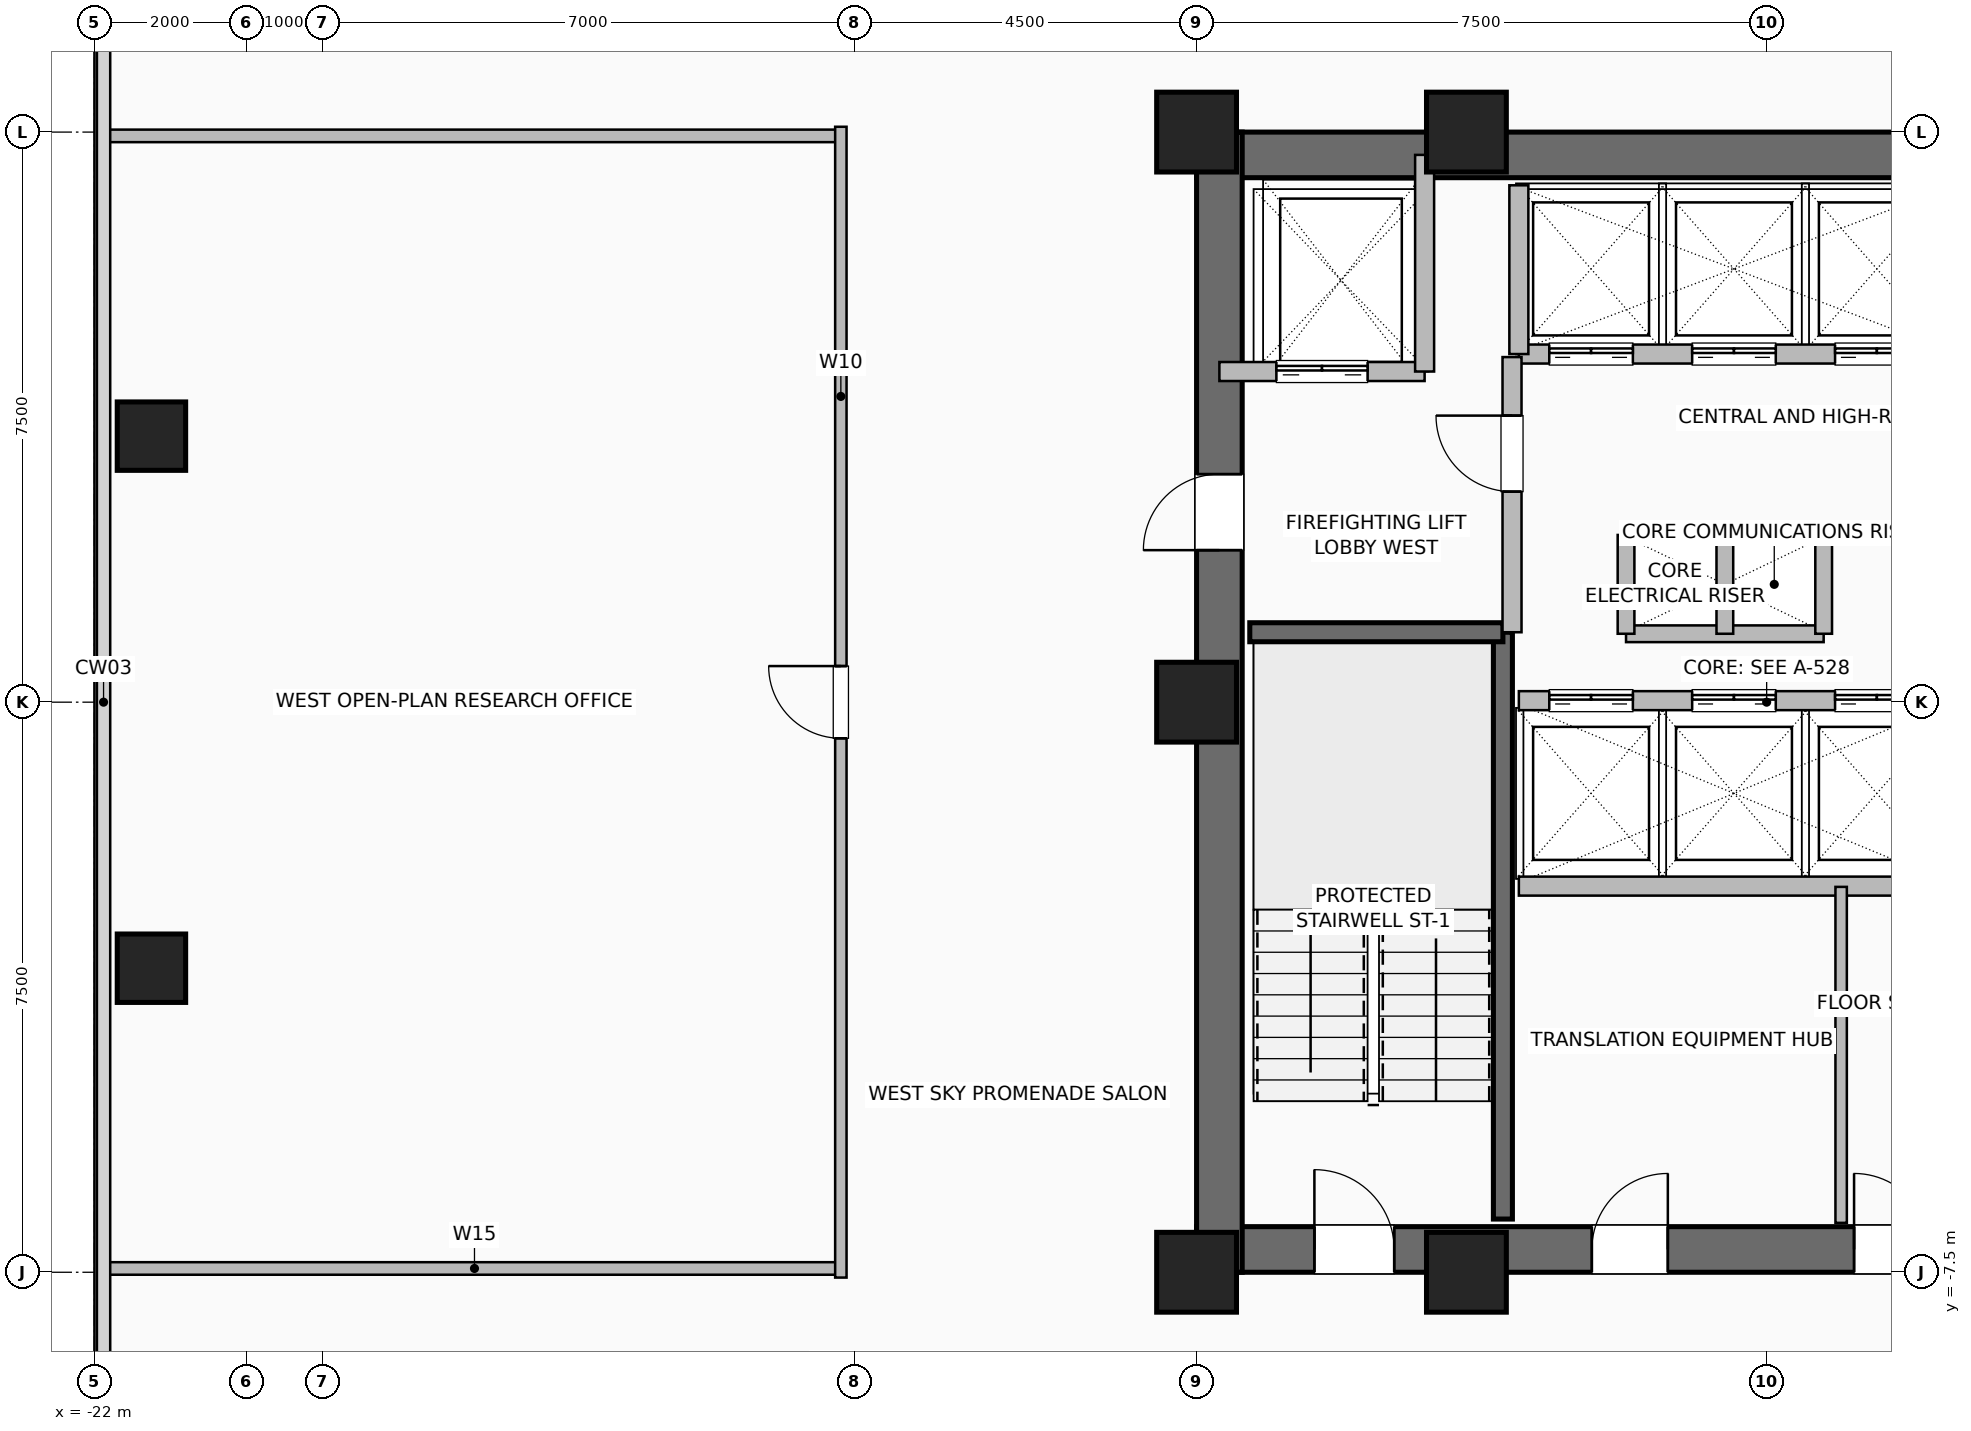
"""IFC4 building model, lengths in metres.
Left out: names, types, materials, properties, quantities, classifications, styles, units other than length and angle.
Written with IfcOpenShell. Run it as: python <this file> out.ifc"""

import sys

from ifc_helpers import new_model, si_unit, direction, frame, frame_2d, origin, origin_2d, place, context, subcontext, project, spatial, rectangle, hollow_rectangle, extrude, element, fill, save


model = new_model("IFC4")
c1 = context("Model", 3, precision=1e-05, world=origin(), true_north=direction((0.0, 1.0)))
c2 = subcontext(c1, "Body", "Model", "MODEL_VIEW")
j1 = project(units=[si_unit("LENGTHUNIT", "METRE"), si_unit("PLANEANGLEUNIT", "RADIAN")], contexts=[c1])
p1 = place(None, origin())
s1 = spatial("IfcSite", under=j1, at=p1, CompositionType="ELEMENT")
p2 = place(p1, origin())
s2 = spatial("IfcBuilding", under=s1, at=p2, CompositionType="ELEMENT")
p3 = place(p2, frame((0.0, 0.0, 108.4)))
s3 = spatial("IfcBuildingStorey", under=s2, at=p3, CompositionType="ELEMENT", Elevation=108.4)
for number, where, z_axis, x_axis in (
    (1, (-7.5, -7.5, 0.0), (0.0, 0.0, 1.0), (1.0, 0.0, 0.0)),
    (2, (-3.95, -7.5, 0.0), (0.0, 0.0, 1.0), (1.0, 0.0, 0.0)),
    (3, (-3.95, 7.5, 0.0), (0.0, 0.0, 1.0), (1.0, 0.0, 0.0)),
    (4, (-7.5, 7.5, 0.0), (0.0, 0.0, 1.0), (1.0, 0.0, 0.0)),
    (5, (-7.5, 0.0, 0.0), (0.0, 0.0, 1.0), (1.0, 0.0, 0.0)),
):
    element("IfcColumn", number, at=place(p3, frame(where, z_axis=z_axis, x_axis=x_axis)), inside=s3, PredefinedType="COLUMN", context=c2, shape_type="SweptSolid", body=[
        extrude(hollow_rectangle(XDim=1.05, YDim=1.05, WallThickness=0.05, at=origin_2d()), origin(), (0.0, 0.0, 1.0), 3.6),
    ])
for number, where, z_axis, x_axis in (
    (6, (-21.25, -3.5, 0.0), (0.0, 0.0, 1.0), (1.0, 0.0, 0.0)),
    (7, (-21.25, 3.5, 0.0), (0.0, 0.0, 1.0), (1.0, 0.0, 0.0)),
):
    element("IfcColumn", number, at=place(p3, frame(where, z_axis=z_axis, x_axis=x_axis)), inside=s3, PredefinedType="COLUMN", context=c2, shape_type="SweptSolid", body=[
        extrude(hollow_rectangle(XDim=0.9, YDim=0.9, WallThickness=0.045, at=origin_2d()), origin(), (0.0, 0.0, 1.0), 3.6),
    ])
p4 = place(p3, frame((-7.5, -7.2, 0.0), z_axis=(0.0, 0.0, 1.0), x_axis=(1.0, 0.0, 0.0)))
e8 = element("IfcWall", 8, at=p4, inside=s3, PredefinedType="SHEAR", context=c2, shape_type="SweptSolid", body=[
    extrude(rectangle(XDim=15.0, YDim=0.6, at=frame_2d((7.5, 0.0))), origin(), (0.0, 0.0, 1.0), 3.36),
])
p5 = place(p4, frame((1.55, 0.0, 0.0)))
e9 = element("IfcOpeningElement", 9, at=p5, cuts=e8, PredefinedType="OPENING", context=c2, shape_type="SweptSolid", body=[
    extrude(rectangle(XDim=1.05, YDim=2.08, at=frame_2d((0.525, 1.04))), frame((0.0, 0.31, 0.0), z_axis=(0.0, -1.0, 0.0), x_axis=(1.0, 0.0, 0.0)), (0.0, 0.0, 1.0), 0.62),
])
p6 = place(p4, frame((12.4, 0.0, 0.0)))
e10 = element("IfcOpeningElement", 10, at=p6, cuts=e8, PredefinedType="OPENING", context=c2, shape_type="SweptSolid", body=[
    extrude(rectangle(XDim=1.05, YDim=2.08, at=frame_2d((0.525, 1.04))), frame((0.0, 0.31, 0.0), z_axis=(0.0, -1.0, 0.0), x_axis=(1.0, 0.0, 0.0)), (0.0, 0.0, 1.0), 0.62),
])
p7 = place(p4, frame((5.2, 0.0, 0.0)))
e11 = element("IfcOpeningElement", 11, at=p7, cuts=e8, PredefinedType="OPENING", context=c2, shape_type="SweptSolid", body=[
    extrude(rectangle(XDim=1.0, YDim=2.08, at=frame_2d((0.5, 1.04))), frame((0.0, 0.31, 0.0), z_axis=(0.0, -1.0, 0.0), x_axis=(1.0, 0.0, 0.0)), (0.0, 0.0, 1.0), 0.62),
])
p8 = place(p4, frame((8.65, 0.0, 0.0)))
e12 = element("IfcOpeningElement", 12, at=p8, cuts=e8, PredefinedType="OPENING", context=c2, shape_type="SweptSolid", body=[
    extrude(rectangle(XDim=1.0, YDim=2.08, at=frame_2d((0.5, 1.04))), frame((0.0, 0.31, 0.0), z_axis=(0.0, -1.0, 0.0), x_axis=(1.0, 0.0, 0.0)), (0.0, 0.0, 1.0), 0.62),
])
p9 = place(p3, frame((-7.5, 7.2, 0.0), z_axis=(0.0, 0.0, 1.0), x_axis=(1.0, 0.0, 0.0)))
e13 = element("IfcWall", 13, at=p9, inside=s3, PredefinedType="SHEAR", context=c2, shape_type="SweptSolid", body=[
    extrude(rectangle(XDim=15.0, YDim=0.6, at=frame_2d((7.5, 0.0))), origin(), (0.0, 0.0, 1.0), 3.36),
])
p10 = place(p3, frame((-7.2, -7.5, 0.0), z_axis=(0.0, 0.0, 1.0), x_axis=(0.0, 1.0, 0.0)))
e14 = element("IfcWall", 14, at=p10, inside=s3, PredefinedType="SHEAR", context=c2, shape_type="SweptSolid", body=[
    extrude(rectangle(XDim=15.0, YDim=0.6, at=frame_2d((7.5, 0.0))), origin(), (0.0, 0.0, 1.0), 3.36),
])
p11 = place(p10, frame((9.5, 0.0, 0.0)))
e15 = element("IfcOpeningElement", 15, at=p11, cuts=e14, PredefinedType="OPENING", context=c2, shape_type="SweptSolid", body=[
    extrude(rectangle(XDim=1.0, YDim=2.08, at=frame_2d((0.5, 1.04))), frame((0.0, 0.31, 0.0), z_axis=(0.0, -1.0, 0.0), x_axis=(1.0, 0.0, 0.0)), (0.0, 0.0, 1.0), 0.62),
])
p12 = place(p3, frame((-3.47, -6.8, 0.0), z_axis=(0.0, 0.0, 1.0), x_axis=(0.0, 1.0, 0.0)))
e16 = element("IfcWall", 16, at=p12, inside=s3, PredefinedType="SHEAR", context=c2, shape_type="SweptSolid", body=[
    extrude(rectangle(XDim=7.72, YDim=0.25, at=frame_2d((3.86, 0.0))), origin(), (0.0, 0.0, 1.0), 3.36),
])
p13 = place(p3, frame((-6.8, 0.92, 0.0), z_axis=(0.0, 0.0, 1.0), x_axis=(1.0, 0.0, 0.0)))
e17 = element("IfcWall", 17, at=p13, inside=s3, PredefinedType="SHEAR", context=c2, shape_type="SweptSolid", body=[
    extrude(rectangle(XDim=3.33, YDim=0.25, at=frame_2d((1.665, 0.0))), origin(), (0.0, 0.0, 1.0), 3.36),
])
for number, where, z_axis, x_axis in (
    (18, (-1.85, 2.2, 0.0), (0.0, 0.0, 1.0), (1.0, 0.0, 0.0)),
    (19, (-1.85, 0.9, 0.0), (0.0, 0.0, 1.0), (1.0, 0.0, 0.0)),
):
    element("IfcWall", number, at=place(p3, frame(where, z_axis=z_axis, x_axis=x_axis)), inside=s3, PredefinedType="PARTITIONING", context=c2, shape_type="SweptSolid", body=[
        extrude(rectangle(XDim=2.6, YDim=0.22, at=frame_2d((1.3, 0.0))), origin(), (0.0, 0.0, 1.0), 3.36),
    ])
for number, where, z_axis, x_axis in (
    (20, (-0.55, 0.9, 0.0), (0.0, 0.0, 1.0), (0.0, 1.0, 0.0)),
    (21, (0.75, 0.9, 0.0), (0.0, 0.0, 1.0), (0.0, 1.0, 0.0)),
    (22, (-1.85, 0.9, 0.0), (0.0, 0.0, 1.0), (0.0, 1.0, 0.0)),
):
    element("IfcWall", number, at=place(p3, frame(where, z_axis=z_axis, x_axis=x_axis)), inside=s3, PredefinedType="PARTITIONING", context=c2, shape_type="SweptSolid", body=[
        extrude(rectangle(XDim=1.3, YDim=0.22, at=frame_2d((0.65, 0.0))), origin(), (0.0, 0.0, 1.0), 3.36),
    ])
p14 = place(p3, frame((-3.26, 0.02, 0.0), z_axis=(0.0, 0.0, 1.0), x_axis=(1.0, 0.0, 0.0)))
e23 = element("IfcWall", 23, at=p14, inside=s3, PredefinedType="SHEAR", context=c2, shape_type="SweptSolid", body=[
    extrude(rectangle(XDim=5.64, YDim=0.25, at=frame_2d((2.82, 0.0))), origin(), (0.0, 0.0, 1.0), 3.36),
])
p15 = place(p14, frame((0.4, 0.0, 0.0)))
e24 = element("IfcOpeningElement", 24, at=p15, cuts=e23, PredefinedType="OPENING", context=c2, shape_type="SweptSolid", body=[
    extrude(rectangle(XDim=1.1, YDim=2.2, at=frame_2d((0.55, 1.1))), frame((0.0, 0.135, 0.0), z_axis=(0.0, -1.0, 0.0), x_axis=(1.0, 0.0, 0.0)), (0.0, 0.0, 1.0), 0.27),
])
p16 = place(p14, frame((2.28, 0.0, 0.0)))
e25 = element("IfcOpeningElement", 25, at=p16, cuts=e23, PredefinedType="OPENING", context=c2, shape_type="SweptSolid", body=[
    extrude(rectangle(XDim=1.1, YDim=2.2, at=frame_2d((0.55, 1.1))), frame((0.0, 0.135, 0.0), z_axis=(0.0, -1.0, 0.0), x_axis=(1.0, 0.0, 0.0)), (0.0, 0.0, 1.0), 0.27),
])
p17 = place(p14, frame((4.16, 0.0, 0.0)))
e26 = element("IfcOpeningElement", 26, at=p17, cuts=e23, PredefinedType="OPENING", context=c2, shape_type="SweptSolid", body=[
    extrude(rectangle(XDim=1.1, YDim=2.2, at=frame_2d((0.55, 1.1))), frame((0.0, 0.135, 0.0), z_axis=(0.0, -1.0, 0.0), x_axis=(1.0, 0.0, 0.0)), (0.0, 0.0, 1.0), 0.27),
])
p18 = place(p3, frame((-3.26, -2.42, 0.0), z_axis=(0.0, 0.0, 1.0), x_axis=(1.0, 0.0, 0.0)))
e27 = element("IfcWall", 27, at=p18, inside=s3, PredefinedType="SHEAR", context=c2, shape_type="SweptSolid", body=[
    extrude(rectangle(XDim=5.64, YDim=0.25, at=frame_2d((2.82, 0.0))), origin(), (0.0, 0.0, 1.0), 3.36),
])
p19 = place(p3, frame((-3.26, 4.58, 0.0), z_axis=(0.0, 0.0, 1.0), x_axis=(1.0, 0.0, 0.0)))
e28 = element("IfcWall", 28, at=p19, inside=s3, PredefinedType="SHEAR", context=c2, shape_type="SweptSolid", body=[
    extrude(rectangle(XDim=5.64, YDim=0.25, at=frame_2d((2.82, 0.0))), origin(), (0.0, 0.0, 1.0), 3.36),
])
p20 = place(p19, frame((0.4, 0.0, 0.0)))
e29 = element("IfcOpeningElement", 29, at=p20, cuts=e28, PredefinedType="OPENING", context=c2, shape_type="SweptSolid", body=[
    extrude(rectangle(XDim=1.1, YDim=2.2, at=frame_2d((0.55, 1.1))), frame((0.0, 0.135, 0.0), z_axis=(0.0, -1.0, 0.0), x_axis=(1.0, 0.0, 0.0)), (0.0, 0.0, 1.0), 0.27),
])
p21 = place(p19, frame((2.28, 0.0, 0.0)))
e30 = element("IfcOpeningElement", 30, at=p21, cuts=e28, PredefinedType="OPENING", context=c2, shape_type="SweptSolid", body=[
    extrude(rectangle(XDim=1.1, YDim=2.2, at=frame_2d((0.55, 1.1))), frame((0.0, 0.135, 0.0), z_axis=(0.0, -1.0, 0.0), x_axis=(1.0, 0.0, 0.0)), (0.0, 0.0, 1.0), 0.27),
])
p22 = place(p19, frame((4.16, 0.0, 0.0)))
e31 = element("IfcOpeningElement", 31, at=p22, cuts=e28, PredefinedType="OPENING", context=c2, shape_type="SweptSolid", body=[
    extrude(rectangle(XDim=1.1, YDim=2.2, at=frame_2d((0.55, 1.1))), frame((0.0, 0.135, 0.0), z_axis=(0.0, -1.0, 0.0), x_axis=(1.0, 0.0, 0.0)), (0.0, 0.0, 1.0), 0.27),
])
p23 = place(p3, frame((-3.26, 4.58, 0.0), z_axis=(0.0, 0.0, 1.0), x_axis=(0.0, 1.0, 0.0)))
e32 = element("IfcWall", 32, at=p23, inside=s3, PredefinedType="SHEAR", context=c2, shape_type="SweptSolid", body=[
    extrude(rectangle(XDim=2.22, YDim=0.25, at=frame_2d((1.11, 0.0))), origin(), (0.0, 0.0, 1.0), 3.36),
])
p24 = place(p3, frame((-7.2, 4.35, 0.0), z_axis=(0.0, 0.0, 1.0), x_axis=(1.0, 0.0, 0.0)))
e33 = element("IfcWall", 33, at=p24, inside=s3, PredefinedType="SHEAR", context=c2, shape_type="SweptSolid", body=[
    extrude(rectangle(XDim=2.7, YDim=0.25, at=frame_2d((1.35, 0.0))), origin(), (0.0, 0.0, 1.0), 3.36),
])
p25 = place(p24, frame((0.75, 0.0, 0.0)))
e34 = element("IfcOpeningElement", 34, at=p25, cuts=e33, PredefinedType="OPENING", context=c2, shape_type="SweptSolid", body=[
    extrude(rectangle(XDim=1.2, YDim=2.2, at=frame_2d((0.6, 1.1))), frame((0.0, 0.135, 0.0), z_axis=(0.0, -1.0, 0.0), x_axis=(1.0, 0.0, 0.0)), (0.0, 0.0, 1.0), 0.27),
])
p26 = place(p3, frame((-4.5, 4.35, 0.0), z_axis=(0.0, 0.0, 1.0), x_axis=(0.0, 1.0, 0.0)))
e35 = element("IfcWall", 35, at=p26, inside=s3, PredefinedType="SHEAR", context=c2, shape_type="SweptSolid", body=[
    extrude(rectangle(XDim=2.85, YDim=0.25, at=frame_2d((1.425, 0.0))), origin(), (0.0, 0.0, 1.0), 3.36),
])
p27 = place(p3, frame((-3.35, 0.92, 0.0), z_axis=(0.0, 0.0, 1.0), x_axis=(0.0, 1.0, 0.0)))
e36 = element("IfcWall", 36, at=p27, inside=s3, PredefinedType="SHEAR", context=c2, shape_type="SweptSolid", body=[
    extrude(rectangle(XDim=3.62, YDim=0.25, at=frame_2d((1.81, 0.0))), origin(), (0.0, 0.0, 1.0), 3.36),
])
p28 = place(p27, frame((1.85, 0.0, 0.0)))
e37 = element("IfcOpeningElement", 37, at=p28, cuts=e36, PredefinedType="OPENING", context=c2, shape_type="SweptSolid", body=[
    extrude(rectangle(XDim=1.0, YDim=2.08, at=frame_2d((0.5, 1.04))), frame((0.0, 0.135, 0.0), z_axis=(0.0, -1.0, 0.0), x_axis=(1.0, 0.0, 0.0)), (0.0, 0.0, 1.0), 0.27),
])
p29 = place(p3, frame((0.98, -6.85, 0.0), z_axis=(0.0, 0.0, 1.0), x_axis=(0.0, 1.0, 0.0)))
e38 = element("IfcWall", 38, at=p29, inside=s3, PredefinedType="PARTITIONING", context=c2, shape_type="SweptSolid", body=[
    extrude(rectangle(XDim=4.42, YDim=0.15, at=frame_2d((2.21, 0.0))), origin(), (0.0, 0.0, 1.0), 3.36),
])
for number, where, z_axis, x_axis in (
    (39, (-21.82, -7.45, 0.0), (0.0, 0.0, 1.0), (1.0, 0.0, 0.0)),
    (40, (-21.82, 7.45, 0.0), (0.0, 0.0, 1.0), (1.0, 0.0, 0.0)),
):
    element("IfcWall", number, at=place(p3, frame(where, z_axis=z_axis, x_axis=x_axis)), inside=s3, PredefinedType="PLUMBINGWALL", context=c2, shape_type="SweptSolid", body=[
        extrude(rectangle(XDim=9.64, YDim=0.165, at=frame_2d((4.82, 0.0))), origin(), (0.0, 0.0, 1.0), 3.36),
    ])
p30 = place(p3, frame((-12.18, -7.57, 0.0), z_axis=(0.0, 0.0, 1.0), x_axis=(0.0, 1.0, 0.0)))
e41 = element("IfcWall", 41, at=p30, inside=s3, PredefinedType="PARTITIONING", context=c2, shape_type="SweptSolid", body=[
    extrude(rectangle(XDim=15.14, YDim=0.15, at=frame_2d((7.57, 0.0))), origin(), (0.0, 0.0, 1.0), 3.36),
])
p31 = place(p30, frame((7.095, 0.0, 0.0)))
e42 = element("IfcOpeningElement", 42, at=p31, cuts=e41, PredefinedType="OPENING", context=c2, shape_type="SweptSolid", body=[
    extrude(rectangle(XDim=0.95, YDim=2.06, at=frame_2d((0.475, 1.03))), frame((0.0, 0.085, 0.0), z_axis=(0.0, -1.0, 0.0), x_axis=(1.0, 0.0, 0.0)), (0.0, 0.0, 1.0), 0.17),
])
p32 = place(p5, origin())
e43 = element("IfcDoor", 43, at=p32, inside=s3, OperationType="SINGLE_SWING_LEFT", PredefinedType="DOOR", context=c2, shape_type="SweptSolid", body=[
    extrude(rectangle(XDim=1.05, YDim=2.08, at=frame_2d((0.525, 1.04))), frame((0.0, 0.025, 0.0), z_axis=(0.0, -1.0, 0.0), x_axis=(1.0, 0.0, 0.0)), (0.0, 0.0, 1.0), 0.05),
])
fill(e9, e43)
p33 = place(p11, origin())
e44 = element("IfcDoor", 44, at=p33, inside=s3, OperationType="SINGLE_SWING_LEFT", PredefinedType="DOOR", context=c2, shape_type="SweptSolid", body=[
    extrude(rectangle(XDim=1.0, YDim=2.08, at=frame_2d((0.5, 1.04))), frame((0.0, 0.025, 0.0), z_axis=(0.0, -1.0, 0.0), x_axis=(1.0, 0.0, 0.0)), (0.0, 0.0, 1.0), 0.05),
])
fill(e15, e44)
p34 = place(p7, origin())
e45 = element("IfcDoor", 45, at=p34, inside=s3, OperationType="SINGLE_SWING_RIGHT", PredefinedType="DOOR", context=c2, shape_type="SweptSolid", body=[
    extrude(rectangle(XDim=1.0, YDim=2.08, at=frame_2d((0.5, 1.04))), frame((0.0, 0.025, 0.0), z_axis=(0.0, -1.0, 0.0), x_axis=(1.0, 0.0, 0.0)), (0.0, 0.0, 1.0), 0.05),
])
fill(e11, e45)
p35 = place(p8, origin())
e46 = element("IfcDoor", 46, at=p35, inside=s3, OperationType="SINGLE_SWING_LEFT", PredefinedType="DOOR", context=c2, shape_type="SweptSolid", body=[
    extrude(rectangle(XDim=1.0, YDim=2.08, at=frame_2d((0.5, 1.04))), frame((0.0, 0.025, 0.0), z_axis=(0.0, -1.0, 0.0), x_axis=(1.0, 0.0, 0.0)), (0.0, 0.0, 1.0), 0.05),
])
fill(e12, e46)
p36 = place(p15, origin())
e47 = element("IfcDoor", 47, at=p36, inside=s3, OperationType="DOUBLE_DOOR_SLIDING", PredefinedType="DOOR", context=c2, shape_type="SweptSolid", body=[
    extrude(rectangle(XDim=1.1, YDim=2.2, at=frame_2d((0.55, 1.1))), frame((0.0, 0.025, 0.0), z_axis=(0.0, -1.0, 0.0), x_axis=(1.0, 0.0, 0.0)), (0.0, 0.0, 1.0), 0.05),
])
fill(e24, e47)
p37 = place(p16, origin())
e48 = element("IfcDoor", 48, at=p37, inside=s3, OperationType="DOUBLE_DOOR_SLIDING", PredefinedType="DOOR", context=c2, shape_type="SweptSolid", body=[
    extrude(rectangle(XDim=1.1, YDim=2.2, at=frame_2d((0.55, 1.1))), frame((0.0, 0.025, 0.0), z_axis=(0.0, -1.0, 0.0), x_axis=(1.0, 0.0, 0.0)), (0.0, 0.0, 1.0), 0.05),
])
fill(e25, e48)
p38 = place(p17, origin())
e49 = element("IfcDoor", 49, at=p38, inside=s3, OperationType="DOUBLE_DOOR_SLIDING", PredefinedType="DOOR", context=c2, shape_type="SweptSolid", body=[
    extrude(rectangle(XDim=1.1, YDim=2.2, at=frame_2d((0.55, 1.1))), frame((0.0, 0.025, 0.0), z_axis=(0.0, -1.0, 0.0), x_axis=(1.0, 0.0, 0.0)), (0.0, 0.0, 1.0), 0.05),
])
fill(e26, e49)
p39 = place(p20, origin())
e50 = element("IfcDoor", 50, at=p39, inside=s3, OperationType="DOUBLE_DOOR_SLIDING", PredefinedType="DOOR", context=c2, shape_type="SweptSolid", body=[
    extrude(rectangle(XDim=1.1, YDim=2.2, at=frame_2d((0.55, 1.1))), frame((0.0, 0.025, 0.0), z_axis=(0.0, -1.0, 0.0), x_axis=(1.0, 0.0, 0.0)), (0.0, 0.0, 1.0), 0.05),
])
fill(e29, e50)
p40 = place(p21, origin())
e51 = element("IfcDoor", 51, at=p40, inside=s3, OperationType="DOUBLE_DOOR_SLIDING", PredefinedType="DOOR", context=c2, shape_type="SweptSolid", body=[
    extrude(rectangle(XDim=1.1, YDim=2.2, at=frame_2d((0.55, 1.1))), frame((0.0, 0.025, 0.0), z_axis=(0.0, -1.0, 0.0), x_axis=(1.0, 0.0, 0.0)), (0.0, 0.0, 1.0), 0.05),
])
fill(e30, e51)
p41 = place(p22, origin())
e52 = element("IfcDoor", 52, at=p41, inside=s3, OperationType="DOUBLE_DOOR_SLIDING", PredefinedType="DOOR", context=c2, shape_type="SweptSolid", body=[
    extrude(rectangle(XDim=1.1, YDim=2.2, at=frame_2d((0.55, 1.1))), frame((0.0, 0.025, 0.0), z_axis=(0.0, -1.0, 0.0), x_axis=(1.0, 0.0, 0.0)), (0.0, 0.0, 1.0), 0.05),
])
fill(e31, e52)
p42 = place(p25, origin())
e53 = element("IfcDoor", 53, at=p42, inside=s3, OperationType="DOUBLE_DOOR_SLIDING", PredefinedType="DOOR", context=c2, shape_type="SweptSolid", body=[
    extrude(rectangle(XDim=1.2, YDim=2.2, at=frame_2d((0.6, 1.1))), frame((0.0, 0.025, 0.0), z_axis=(0.0, -1.0, 0.0), x_axis=(1.0, 0.0, 0.0)), (0.0, 0.0, 1.0), 0.05),
])
fill(e34, e53)
p43 = place(p28, origin())
e54 = element("IfcDoor", 54, at=p43, inside=s3, OperationType="SINGLE_SWING_RIGHT", PredefinedType="DOOR", context=c2, shape_type="SweptSolid", body=[
    extrude(rectangle(XDim=1.0, YDim=2.08, at=frame_2d((0.5, 1.04))), frame((0.0, 0.025, 0.0), z_axis=(0.0, -1.0, 0.0), x_axis=(1.0, 0.0, 0.0)), (0.0, 0.0, 1.0), 0.05),
])
fill(e37, e54)
p44 = place(p31, origin())
e55 = element("IfcDoor", 55, at=p44, inside=s3, OperationType="SINGLE_SWING_RIGHT", PredefinedType="DOOR", context=c2, shape_type="SweptSolid", body=[
    extrude(rectangle(XDim=0.95, YDim=2.06, at=frame_2d((0.475, 1.03))), frame((0.0, 0.025, 0.0), z_axis=(0.0, -1.0, 0.0), x_axis=(1.0, 0.0, 0.0)), (0.0, 0.0, 1.0), 0.05),
])
fill(e42, e55)
save(model, sys.argv[1])
